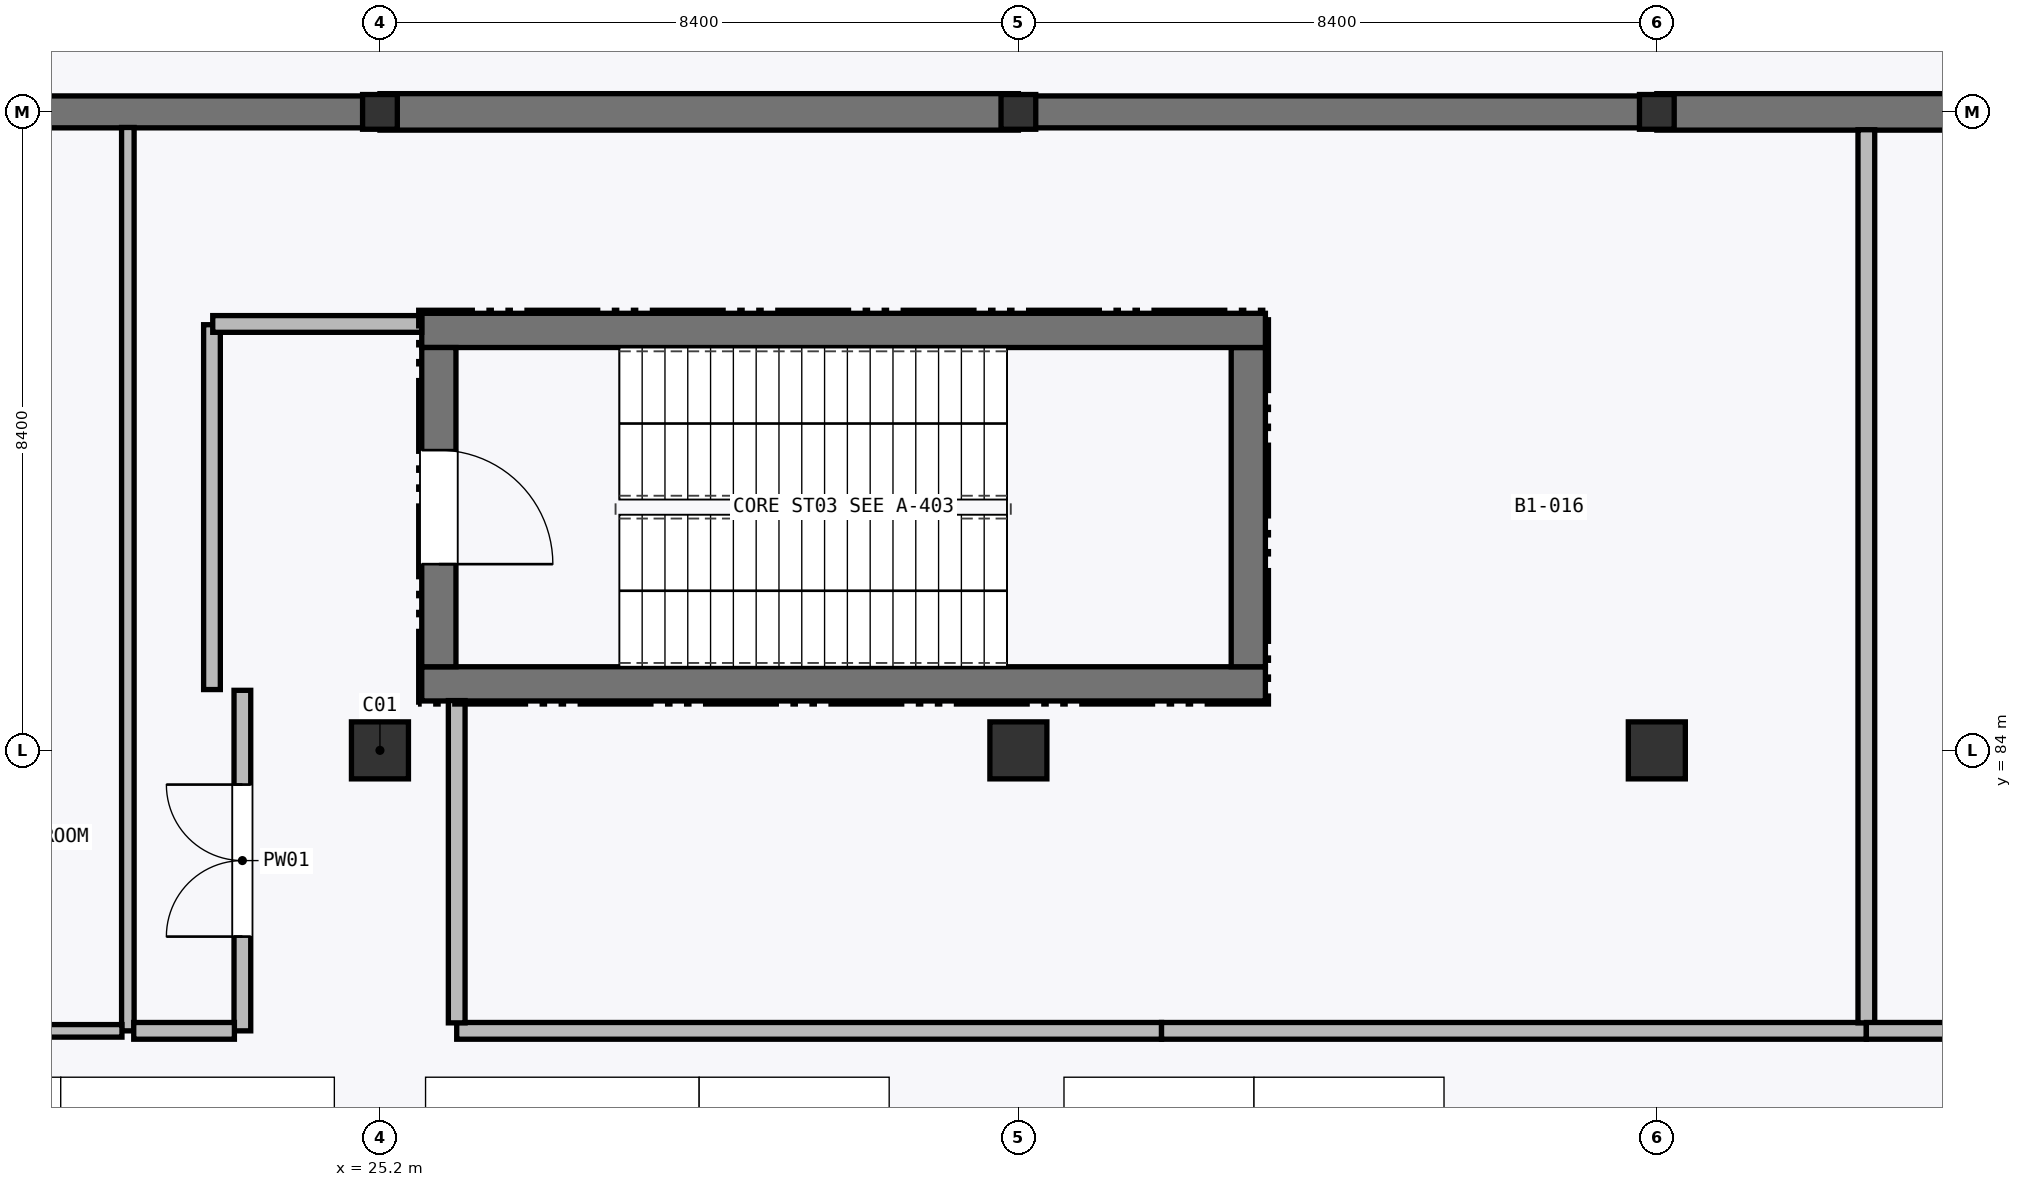
"""IFC4 building model, lengths in metres.
Left out: names, types, materials, properties, quantities, classifications, styles, units other than length and angle.
Written with IfcOpenShell. Run it as: python <this file> out.ifc"""

import sys

from ifc_helpers import new_model, si_unit, direction, frame, frame_2d, origin, origin_2d, place, context, subcontext, project, spatial, rectangle, hollow_rectangle, hollow_circle, extrude, element, fill, save


model = new_model("IFC4")
c1 = context("Model", 3, precision=1e-05, world=origin(), true_north=direction((0.0, 1.0)))
c2 = subcontext(c1, "Body", "Model", "MODEL_VIEW")
j1 = project(units=[si_unit("LENGTHUNIT", "METRE"), si_unit("PLANEANGLEUNIT", "RADIAN")], contexts=[c1])
p1 = place(None, origin())
s1 = spatial("IfcSite", under=j1, at=p1, CompositionType="ELEMENT")
p2 = place(p1, origin())
s2 = spatial("IfcBuilding", under=s1, at=p2, CompositionType="ELEMENT")
p3 = place(p2, frame((0.0, 0.0, -5.4)))
s3 = spatial("IfcBuildingStorey", under=s2, at=p3, CompositionType="ELEMENT", Elevation=-5.4)
p4 = place(p3, frame((25.2, 84.0, 0.0), z_axis=(0.0, 0.0, 1.0), x_axis=(1.0, 0.0, 0.0)))
e1 = element("IfcColumn", 1, at=p4, inside=s3, PredefinedType="COLUMN", context=c2, shape_type="SweptSolid", body=[
    extrude(hollow_rectangle(XDim=0.75, YDim=0.75, WallThickness=0.028, at=origin_2d()), origin(), (0.0, 0.0, 1.0), 5.4),
])
p5 = place(p3, frame((25.2, 92.4, 0.0), z_axis=(0.0, 0.0, 1.0), x_axis=(1.0, 0.0, 0.0)))
e2 = element("IfcColumn", 2, at=p5, inside=s3, PredefinedType="COLUMN", context=c2, shape_type="SweptSolid", body=[
    extrude(hollow_circle(Radius=0.229, WallThickness=0.016, at=origin_2d()), origin(), (0.0, 0.0, 1.0), 5.4),
])
p6 = place(p3, frame((33.6, 84.0, 0.0), z_axis=(0.0, 0.0, 1.0), x_axis=(1.0, 0.0, 0.0)))
e3 = element("IfcColumn", 3, at=p6, inside=s3, PredefinedType="COLUMN", context=c2, shape_type="SweptSolid", body=[
    extrude(hollow_rectangle(XDim=0.75, YDim=0.75, WallThickness=0.028, at=origin_2d()), origin(), (0.0, 0.0, 1.0), 5.4),
])
p7 = place(p3, frame((33.6, 92.4, 0.0), z_axis=(0.0, 0.0, 1.0), x_axis=(1.0, 0.0, 0.0)))
e4 = element("IfcColumn", 4, at=p7, inside=s3, PredefinedType="COLUMN", context=c2, shape_type="SweptSolid", body=[
    extrude(hollow_circle(Radius=0.229, WallThickness=0.016, at=origin_2d()), origin(), (0.0, 0.0, 1.0), 5.4),
])
p8 = place(p3, frame((42.0, 84.0, 0.0), z_axis=(0.0, 0.0, 1.0), x_axis=(1.0, 0.0, 0.0)))
e5 = element("IfcColumn", 5, at=p8, inside=s3, PredefinedType="COLUMN", context=c2, shape_type="SweptSolid", body=[
    extrude(hollow_rectangle(XDim=0.75, YDim=0.75, WallThickness=0.028, at=origin_2d()), origin(), (0.0, 0.0, 1.0), 5.4),
])
p9 = place(p3, frame((42.0, 92.4, 0.0), z_axis=(0.0, 0.0, 1.0), x_axis=(1.0, 0.0, 0.0)))
e6 = element("IfcColumn", 6, at=p9, inside=s3, PredefinedType="COLUMN", context=c2, shape_type="SweptSolid", body=[
    extrude(hollow_circle(Radius=0.229, WallThickness=0.016, at=origin_2d()), origin(), (0.0, 0.0, 1.0), 5.4),
])
p10 = place(p3, frame((16.8, 92.4, 0.0), z_axis=(0.0, 0.0, 1.0), x_axis=(1.0, 0.0, 0.0)))
e7 = element("IfcWall", 7, at=p10, inside=s3, PredefinedType="USERDEFINED", context=c2, shape_type="SweptSolid", body=[
    extrude(rectangle(XDim=8.4, YDim=0.42, at=frame_2d((4.2, 0.0))), origin(), (0.0, 0.0, 1.0), 5.13),
])
p11 = place(p3, frame((25.2, 92.4, 0.0), z_axis=(0.0, 0.0, 1.0), x_axis=(1.0, 0.0, 0.0)))
e8 = element("IfcWall", 8, at=p11, inside=s3, PredefinedType="USERDEFINED", context=c2, shape_type="SweptSolid", body=[
    extrude(rectangle(XDim=8.4, YDim=0.48, at=frame_2d((4.2, 0.0))), origin(), (0.0, 0.0, 1.0), 5.13),
])
p12 = place(p3, frame((33.6, 92.4, 0.0), z_axis=(0.0, 0.0, 1.0), x_axis=(1.0, 0.0, 0.0)))
e9 = element("IfcWall", 9, at=p12, inside=s3, PredefinedType="USERDEFINED", context=c2, shape_type="SweptSolid", body=[
    extrude(rectangle(XDim=8.4, YDim=0.42, at=frame_2d((4.2, 0.0))), origin(), (0.0, 0.0, 1.0), 5.13),
])
p13 = place(p3, frame((42.0, 92.4, 0.0), z_axis=(0.0, 0.0, 1.0), x_axis=(1.0, 0.0, 0.0)))
e10 = element("IfcWall", 10, at=p13, inside=s3, PredefinedType="USERDEFINED", context=c2, shape_type="SweptSolid", body=[
    extrude(rectangle(XDim=8.4, YDim=0.48, at=frame_2d((4.2, 0.0))), origin(), (0.0, 0.0, 1.0), 5.13),
])
p14 = place(p3, frame((25.75, 84.875, 0.0), z_axis=(0.0, 0.0, 1.0), x_axis=(1.0, 0.0, 0.0)))
e11 = element("IfcWall", 11, at=p14, inside=s3, PredefinedType="SHEAR", context=c2, shape_type="SweptSolid", body=[
    extrude(rectangle(XDim=11.1, YDim=0.45, at=frame_2d((5.55, 0.0))), origin(), (0.0, 0.0, 1.0), 5.145),
])
p15 = place(p3, frame((36.625, 85.1, 0.0), z_axis=(0.0, 0.0, 1.0), x_axis=(0.0, 1.0, 0.0)))
e12 = element("IfcWall", 12, at=p15, inside=s3, PredefinedType="SHEAR", context=c2, shape_type="SweptSolid", body=[
    extrude(rectangle(XDim=4.2, YDim=0.45, at=frame_2d((2.1, 0.0))), origin(), (0.0, 0.0, 1.0), 5.145),
])
p16 = place(p3, frame((36.85, 89.525, 0.0), z_axis=(0.0, 0.0, 1.0), x_axis=(-1.0, 0.0, 0.0)))
e13 = element("IfcWall", 13, at=p16, inside=s3, PredefinedType="SHEAR", context=c2, shape_type="SweptSolid", body=[
    extrude(rectangle(XDim=11.1, YDim=0.45, at=frame_2d((5.55, 0.0))), origin(), (0.0, 0.0, 1.0), 5.145),
])
p17 = place(p3, frame((25.975, 89.3, 0.0), z_axis=(0.0, 0.0, 1.0), x_axis=(0.0, -1.0, 0.0)))
e14 = element("IfcWall", 14, at=p17, inside=s3, PredefinedType="SHEAR", context=c2, shape_type="SweptSolid", body=[
    extrude(rectangle(XDim=4.2, YDim=0.45, at=frame_2d((2.1, 0.0))), origin(), (0.0, 0.0, 1.0), 5.145),
])
p18 = place(p17, frame((1.35, 0.0, 0.0)))
e15 = element("IfcOpeningElement", 15, at=p18, cuts=e14, PredefinedType="OPENING", context=c2, shape_type="SweptSolid", body=[
    extrude(rectangle(XDim=1.5, YDim=2.15, at=frame_2d((0.75, 1.075))), frame((0.0, 0.235, 0.0), z_axis=(0.0, -1.0, 0.0), x_axis=(1.0, 0.0, 0.0)), (0.0, 0.0, 1.0), 0.47),
])
p19 = place(p3, frame((21.883, 80.31, 0.0), z_axis=(0.0, 0.0, 1.0), x_axis=(0.0, 1.0, 0.0)))
e16 = element("IfcWall", 16, at=p19, inside=s3, PredefinedType="PARTITIONING", context=c2, shape_type="SweptSolid", body=[
    extrude(rectangle(XDim=11.885, YDim=0.165, at=frame_2d((5.942, 0.0))), origin(), (0.0, 0.0, 1.0), 5.145),
])
p20 = place(p3, frame((10.6, 80.31, 0.0), z_axis=(0.0, 0.0, 1.0), x_axis=(1.0, 0.0, 0.0)))
e17 = element("IfcWall", 17, at=p20, inside=s3, PredefinedType="PARTITIONING", context=c2, shape_type="SweptSolid", body=[
    extrude(rectangle(XDim=11.206, YDim=0.165, at=frame_2d((5.603, 0.0))), origin(), (0.0, 0.0, 1.0), 5.145),
])
p21 = place(p3, frame((23.39, 80.31, 0.0), z_axis=(0.0, 0.0, 1.0), x_axis=(0.0, 1.0, 0.0)))
e18 = element("IfcWall", 18, at=p21, inside=s3, PredefinedType="PARTITIONING", context=c2, shape_type="SweptSolid", body=[
    extrude(rectangle(XDim=4.48, YDim=0.22, at=frame_2d((2.24, 0.0))), origin(), (0.0, 0.0, 1.0), 5.145),
])
p22 = place(p21, frame((1.24, 0.0, 0.0)))
e19 = element("IfcOpeningElement", 19, at=p22, cuts=e18, PredefinedType="OPENING", context=c2, shape_type="SweptSolid", body=[
    extrude(rectangle(XDim=2.0, YDim=2.2, at=frame_2d((1.0, 1.1))), frame((0.0, 0.12, 0.0), z_axis=(0.0, -1.0, 0.0), x_axis=(1.0, 0.0, 0.0)), (0.0, 0.0, 1.0), 0.24),
])
p23 = place(p3, frame((21.961, 80.31, 0.0), z_axis=(0.0, 0.0, 1.0), x_axis=(1.0, 0.0, 0.0)))
e20 = element("IfcWall", 20, at=p23, inside=s3, PredefinedType="PARTITIONING", context=c2, shape_type="SweptSolid", body=[
    extrude(rectangle(XDim=1.324, YDim=0.22, at=frame_2d((0.662, 0.0))), origin(), (0.0, 0.0, 1.0), 5.145),
])
p24 = place(p3, frame((22.99, 84.8, 0.0), z_axis=(0.0, 0.0, 1.0), x_axis=(0.0, 1.0, 0.0)))
e21 = element("IfcWall", 21, at=p24, inside=s3, PredefinedType="PARTITIONING", context=c2, shape_type="SweptSolid", body=[
    extrude(rectangle(XDim=4.8, YDim=0.22, at=frame_2d((2.4, 0.0))), origin(), (0.0, 0.0, 1.0), 5.145),
])
p25 = place(p3, frame((26.21, 80.31, 0.0), z_axis=(0.0, 0.0, 1.0), x_axis=(1.0, 0.0, 0.0)))
e22 = element("IfcWall", 22, at=p25, inside=s3, PredefinedType="PARTITIONING", context=c2, shape_type="SweptSolid", body=[
    extrude(rectangle(XDim=9.273, YDim=0.22, at=frame_2d((4.637, 0.0))), origin(), (0.0, 0.0, 1.0), 5.145),
])
p26 = place(p3, frame((35.483, 80.31, 0.0), z_axis=(0.0, 0.0, 1.0), x_axis=(1.0, 0.0, 0.0)))
e23 = element("IfcWall", 23, at=p26, inside=s3, PredefinedType="PARTITIONING", context=c2, shape_type="SweptSolid", body=[
    extrude(rectangle(XDim=9.273, YDim=0.22, at=frame_2d((4.637, 0.0))), origin(), (0.0, 0.0, 1.0), 5.145),
])
p27 = place(p3, frame((26.21, 84.655, 0.0), z_axis=(0.0, 0.0, 1.0), x_axis=(0.0, -1.0, 0.0)))
e24 = element("IfcWall", 24, at=p27, inside=s3, PredefinedType="PARTITIONING", context=c2, shape_type="SweptSolid", body=[
    extrude(rectangle(XDim=4.24, YDim=0.22, at=frame_2d((2.12, 0.0))), origin(), (0.0, 0.0, 1.0), 5.145),
])
p28 = place(p3, frame((44.757, 80.415, 0.0), z_axis=(0.0, 0.0, 1.0), x_axis=(0.0, 1.0, 0.0)))
e25 = element("IfcWall", 25, at=p28, inside=s3, PredefinedType="PARTITIONING", context=c2, shape_type="SweptSolid", body=[
    extrude(rectangle(XDim=11.75, YDim=0.22, at=frame_2d((5.875, 0.0))), origin(), (0.0, 0.0, 1.0), 4.782),
])
p29 = place(p3, frame((23.0, 89.61, 0.0), z_axis=(0.0, 0.0, 1.0), x_axis=(1.0, 0.0, 0.0)))
e26 = element("IfcWall", 26, at=p29, inside=s3, PredefinedType="PARTITIONING", context=c2, shape_type="SweptSolid", body=[
    extrude(rectangle(XDim=2.75, YDim=0.22, at=frame_2d((1.375, 0.0))), origin(), (0.0, 0.0, 1.0), 5.145),
])
p30 = place(p3, frame((44.757, 80.31, 0.0), z_axis=(0.0, 0.0, 1.0), x_axis=(1.0, 0.0, 0.0)))
e27 = element("IfcWall", 27, at=p30, inside=s3, PredefinedType="PARTITIONING", context=c2, shape_type="SweptSolid", body=[
    extrude(rectangle(XDim=5.443, YDim=0.22, at=frame_2d((2.722, 0.0))), origin(), (0.0, 0.0, 1.0), 5.145),
])
p31 = place(p18, origin())
e28 = element("IfcDoor", 28, at=p31, inside=s3, OperationType="SINGLE_SWING_RIGHT", PredefinedType="DOOR", context=c2, shape_type="SweptSolid", body=[
    extrude(rectangle(XDim=1.5, YDim=2.15, at=frame_2d((0.75, 1.075))), frame((0.0, 0.025, 0.0), z_axis=(0.0, -1.0, 0.0), x_axis=(1.0, 0.0, 0.0)), (0.0, 0.0, 1.0), 0.05),
])
fill(e15, e28)
p32 = place(p22, origin())
e29 = element("IfcDoor", 29, at=p32, inside=s3, OperationType="DOUBLE_DOOR_SINGLE_SWING", PredefinedType="DOOR", context=c2, shape_type="SweptSolid", body=[
    extrude(rectangle(XDim=2.0, YDim=2.2, at=frame_2d((1.0, 1.1))), frame((0.0, 0.025, 0.0), z_axis=(0.0, -1.0, 0.0), x_axis=(1.0, 0.0, 0.0)), (0.0, 0.0, 1.0), 0.05),
])
fill(e19, e29)
save(model, sys.argv[1])
